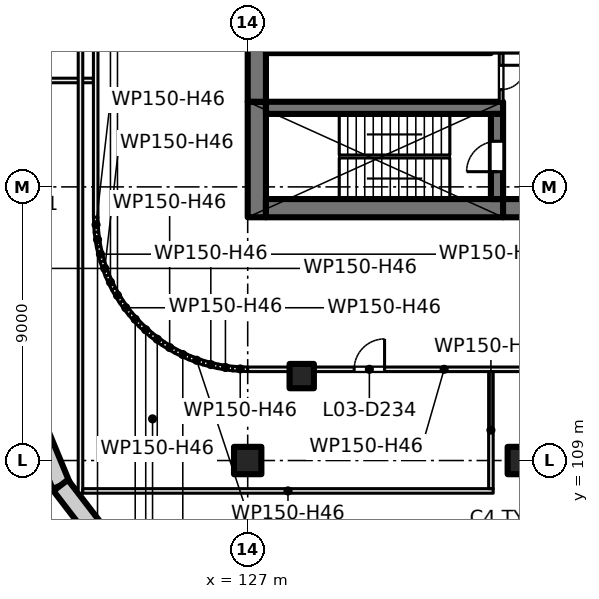
"""IFC4 building model, lengths in metres.
Left out: names, types, materials, properties, quantities, classifications, styles, units other than length and angle.
Written with IfcOpenShell. Run it as: python <this file> out.ifc"""

import sys

from ifc_helpers import new_model, si_unit, direction, frame, frame_2d, origin, origin_2d, place, context, subcontext, project, spatial, rectangle, extrude, element, fill, save


model = new_model("IFC4")
c1 = context("Model", 3, precision=1e-05, world=origin(), true_north=direction((0.0, 1.0)))
c2 = subcontext(c1, "Body", "Model", "MODEL_VIEW")
j1 = project(units=[si_unit("LENGTHUNIT", "METRE"), si_unit("PLANEANGLEUNIT", "RADIAN")], contexts=[c1])
p1 = place(None, origin())
s1 = spatial("IfcSite", under=j1, at=p1, CompositionType="ELEMENT")
p2 = place(p1, origin())
s2 = spatial("IfcBuilding", under=s1, at=p2, CompositionType="ELEMENT")
p3 = place(p2, frame((0.0, 0.0, 17.5)))
s3 = spatial("IfcBuildingStorey", under=s2, at=p3, CompositionType="ELEMENT", Elevation=17.5)
for number, where, z_axis, x_axis in (
    (1, (127.0, 109.0, 0.0), (0.0, 0.0, 1.0), (1.0, 0.0, 0.0)),
    (2, (136.0, 109.0, 0.0), (0.0, 0.0, 1.0), (1.0, 0.0, 0.0)),
):
    element("IfcColumn", number, at=place(p3, frame(where, z_axis=z_axis, x_axis=x_axis)), inside=s3, PredefinedType="COLUMN", context=c2, shape_type="SweptSolid", body=[
        extrude(rectangle(XDim=0.9, YDim=0.9, at=origin_2d()), origin(), (0.0, 0.0, 1.0), 5.0),
    ])
p4 = place(p3, frame((128.777, 111.777, 0.0), z_axis=(0.0, 0.0, 1.0), x_axis=(1.0, 0.0, 0.0)))
e3 = element("IfcColumn", 3, at=p4, inside=s3, PredefinedType="COLUMN", context=c2, shape_type="SweptSolid", body=[
    extrude(rectangle(XDim=0.8, YDim=0.8, at=origin_2d()), origin(), (0.0, 0.0, 1.0), 5.0),
])
p5 = place(p3, frame((127.3, 117.0, 0.0), z_axis=(0.0, 0.0, 1.0), x_axis=(0.0, 1.0, 0.0)))
e4 = element("IfcWall", 4, at=p5, inside=s3, PredefinedType="SHEAR", context=c2, shape_type="SweptSolid", body=[
    extrude(rectangle(XDim=3.8, YDim=0.6, at=frame_2d((1.9, 0.0))), origin(), (0.0, 0.0, 1.0), 5.0),
])
p6 = place(p3, frame((127.3, 120.8, 0.0), z_axis=(0.0, 0.0, 1.0), x_axis=(0.0, 1.0, 0.0)))
e5 = element("IfcWall", 5, at=p6, inside=s3, PredefinedType="SHEAR", context=c2, shape_type="SweptSolid", body=[
    extrude(rectangle(XDim=14.4, YDim=0.6, at=frame_2d((7.2, 0.0))), origin(), (0.0, 0.0, 1.0), 5.0),
])
p7 = place(p3, frame((127.6, 117.3, 0.0), z_axis=(0.0, 0.0, 1.0), x_axis=(1.0, 0.0, 0.0)))
e6 = element("IfcWall", 6, at=p7, inside=s3, PredefinedType="SHEAR", context=c2, shape_type="SweptSolid", body=[
    extrude(rectangle(XDim=7.8, YDim=0.6, at=frame_2d((3.9, 0.0))), origin(), (0.0, 0.0, 1.0), 5.0),
])
p8 = place(p3, frame((135.4, 117.3, 0.0), z_axis=(0.0, 0.0, 1.0), x_axis=(1.0, 0.0, 0.0)))
e7 = element("IfcWall", 7, at=p8, inside=s3, PredefinedType="SHEAR", context=c2, shape_type="SweptSolid", body=[
    extrude(rectangle(XDim=4.6, YDim=0.6, at=frame_2d((2.3, 0.0))), origin(), (0.0, 0.0, 1.0), 5.0),
])
p9 = place(p3, frame((127.6, 120.6, 0.0), z_axis=(0.0, 0.0, 1.0), x_axis=(1.0, 0.0, 0.0)))
e8 = element("IfcWall", 8, at=p9, inside=s3, PredefinedType="SHEAR", context=c2, shape_type="SweptSolid", body=[
    extrude(rectangle(XDim=7.8, YDim=0.4, at=frame_2d((3.9, 0.0))), origin(), (0.0, 0.0, 1.0), 5.0),
])
p10 = place(p3, frame((135.2, 117.6, 0.0), z_axis=(0.0, 0.0, 1.0), x_axis=(0.0, 1.0, 0.0)))
e9 = element("IfcWall", 9, at=p10, inside=s3, PredefinedType="SHEAR", context=c2, shape_type="SweptSolid", body=[
    extrude(rectangle(XDim=2.8, YDim=0.4, at=frame_2d((1.4, 0.0))), origin(), (0.0, 0.0, 1.0), 5.0),
])
p11 = place(p10, frame((0.9, 0.0, 0.0)))
e10 = element("IfcOpeningElement", 10, at=p11, cuts=e9, PredefinedType="OPENING", context=c2, shape_type="SweptSolid", body=[
    extrude(rectangle(XDim=1.0, YDim=2.1, at=frame_2d((0.5, 1.05))), frame((0.0, 0.21, 0.0), z_axis=(0.0, -1.0, 0.0), x_axis=(1.0, 0.0, 0.0)), (0.0, 0.0, 1.0), 0.42),
])
p12 = place(p3, frame((127.6, 122.6, 0.0), z_axis=(0.0, 0.0, 1.0), x_axis=(1.0, 0.0, 0.0)))
e11 = element("IfcWall", 11, at=p12, inside=s3, PredefinedType="SHEAR", context=c2, shape_type="SweptSolid", body=[
    extrude(rectangle(XDim=7.4, YDim=0.4, at=frame_2d((3.7, 0.0))), origin(), (0.0, 0.0, 1.0), 5.0),
])
p13 = place(p3, frame((120.86, 108.181, 0.0), z_axis=(0.0, 0.0, 1.0), x_axis=(-0.382341242798, 0.924021197839, 0.0)))
e12 = element("IfcWall", 12, at=p13, inside=s3, PredefinedType="SOLIDWALL", context=c2, shape_type="SweptSolid", body=[
    extrude(rectangle(XDim=2.044, YDim=0.6, at=frame_2d((1.022, 0.0))), origin(), (0.0, 0.0, 1.0), 4.6),
])
p14 = place(p3, frame((122.135, 106.507, 0.0), z_axis=(0.0, 0.0, 1.0), x_axis=(-0.609052002567, 0.79313029079, 0.0)))
e13 = element("IfcWall", 13, at=p14, inside=s3, PredefinedType="SOLIDWALL", context=c2, shape_type="SweptSolid", body=[
    extrude(rectangle(XDim=2.114, YDim=0.6, at=frame_2d((1.057, 0.0))), origin(), (0.0, 0.0, 1.0), 4.6),
])
p15 = place(p3, frame((139.6, 122.5, 0.0), z_axis=(0.0, 0.0, 1.0), x_axis=(-1.0, 0.0, 0.0)))
e14 = element("IfcWall", 14, at=p15, inside=s3, PredefinedType="PARTITIONING", context=c2, shape_type="SweptSolid", body=[
    extrude(rectangle(XDim=4.6, YDim=0.2, at=frame_2d((2.3, 0.0))), origin(), (0.0, 0.0, 1.0), 4.6),
])
p16 = place(p15, frame((1.35, 0.0, 0.0)))
e15 = element("IfcOpeningElement", 15, at=p16, cuts=e14, PredefinedType="OPENING", context=c2, shape_type="SweptSolid", body=[
    extrude(rectangle(XDim=1.5, YDim=2.1, at=frame_2d((0.75, 1.05))), frame((0.0, 0.11, 0.0), z_axis=(0.0, -1.0, 0.0), x_axis=(1.0, 0.0, 0.0)), (0.0, 0.0, 1.0), 0.22),
])
p17 = place(p3, frame((135.337, 122.4, 0.0), z_axis=(0.0, 0.0, 1.0), x_axis=(0.0, -1.0, 0.0)))
e16 = element("IfcWall", 16, at=p17, inside=s3, PredefinedType="PARTITIONING", context=c2, shape_type="SweptSolid", body=[
    extrude(rectangle(XDim=1.6, YDim=0.125, at=frame_2d((0.8, 0.0))), origin(), (0.0, 0.0, 1.0), 4.6),
])
p18 = place(p17, frame((0.4, 0.0, 0.0)))
e17 = element("IfcOpeningElement", 17, at=p18, cuts=e16, PredefinedType="OPENING", context=c2, shape_type="SweptSolid", body=[
    extrude(rectangle(XDim=0.8, YDim=2.1, at=frame_2d((0.4, 1.05))), frame((0.0, 0.073, 0.0), z_axis=(0.0, -1.0, 0.0), x_axis=(1.0, 0.0, 0.0)), (0.0, 0.0, 1.0), 0.145),
])
p19 = place(p3, frame((113.075, 121.5, 0.0), z_axis=(0.0, 0.0, 1.0), x_axis=(1.0, 0.0, 0.0)))
e18 = element("IfcWall", 18, at=p19, inside=s3, PredefinedType="PARTITIONING", context=c2, shape_type="SweptSolid", body=[
    extrude(rectangle(XDim=8.85, YDim=0.15, at=frame_2d((4.425, 0.0))), origin(), (0.0, 0.0, 1.0), 4.6),
])
p20 = place(p3, frame((121.5, 107.925, 0.0), z_axis=(0.0, 0.0, 1.0), x_axis=(0.0, 1.0, 0.0)))
e19 = element("IfcWall", 19, at=p20, inside=s3, PredefinedType="PARTITIONING", context=c2, shape_type="SweptSolid", body=[
    extrude(rectangle(XDim=40.247, YDim=0.15, at=frame_2d((20.124, 0.0))), origin(), (0.0, 0.0, 1.0), 4.6),
])
p21 = place(p3, frame((121.575, 108.0, 0.0), z_axis=(0.0, 0.0, 1.0), x_axis=(1.0, 0.0, 0.0)))
e20 = element("IfcWall", 20, at=p21, inside=s3, PredefinedType="PARTITIONING", context=c2, shape_type="SweptSolid", body=[
    extrude(rectangle(XDim=13.5, YDim=0.15, at=frame_2d((6.75, 0.0))), origin(), (0.0, 0.0, 1.0), 4.6),
])
p22 = place(p3, frame((122.0, 139.002, 0.0), z_axis=(0.0, 0.0, 1.0), x_axis=(0.0, -1.0, 0.0)))
e21 = element("IfcWall", 21, at=p22, inside=s3, PredefinedType="PARTITIONING", context=c2, shape_type="SweptSolid", body=[
    extrude(rectangle(XDim=22.004, YDim=0.15, at=frame_2d((11.002, 0.0))), origin(), (0.0, 0.0, 1.0), 4.6),
])
p23 = place(p22, frame((10.252, 0.0, 0.0)))
e22 = element("IfcOpeningElement", 22, at=p23, cuts=e21, PredefinedType="OPENING", context=c2, shape_type="SweptSolid", body=[
    extrude(rectangle(XDim=1.0, YDim=2.1, at=frame_2d((0.5, 1.05))), frame((0.0, 0.085, 0.0), z_axis=(0.0, -1.0, 0.0), x_axis=(1.0, 0.0, 0.0)), (0.0, 0.0, 1.0), 0.17),
])
p24 = place(p3, frame((122.0, 117.002, 0.0), z_axis=(0.0, 0.0, 1.0), x_axis=(0.048196018647, -0.998837896651, 0.0)))
e23 = element("IfcWall", 23, at=p24, inside=s3, PredefinedType="PARTITIONING", context=c2, shape_type="SweptSolid", body=[
    extrude(rectangle(XDim=0.496, YDim=0.15, at=frame_2d((0.248, 0.0))), origin(), (0.0, 0.0, 1.0), 4.6),
])
p25 = place(p3, frame((122.023, 116.514, 0.0), z_axis=(0.0, 0.0, 1.0), x_axis=(0.148412307247, -0.988925572052, 0.0)))
e24 = element("IfcWall", 24, at=p25, inside=s3, PredefinedType="PARTITIONING", context=c2, shape_type="SweptSolid", body=[
    extrude(rectangle(XDim=0.499, YDim=0.15, at=frame_2d((0.249, 0.0))), origin(), (0.0, 0.0, 1.0), 4.6),
])
p26 = place(p3, frame((122.095, 116.029, 0.0), z_axis=(0.0, 0.0, 1.0), x_axis=(0.242650732785, -0.970113715952, 0.0)))
e25 = element("IfcWall", 25, at=p26, inside=s3, PredefinedType="PARTITIONING", context=c2, shape_type="SweptSolid", body=[
    extrude(rectangle(XDim=0.499, YDim=0.15, at=frame_2d((0.25, 0.0))), origin(), (0.0, 0.0, 1.0), 4.6),
])
for number, where, z_axis, x_axis in (
    (26, (122.214, 115.553, 0.0), (0.0, 0.0, 1.0), (0.337, -0.941, 0.0)),
    (27, (122.379, 115.09, 0.0), (0.0, 0.0, 1.0), (0.428, -0.904, 0.0)),
):
    element("IfcWall", number, at=place(p3, frame(where, z_axis=z_axis, x_axis=x_axis)), inside=s3, PredefinedType="PARTITIONING", context=c2, shape_type="SweptSolid", body=[
        extrude(rectangle(XDim=0.498, YDim=0.15, at=frame_2d((0.249, 0.0))), origin(), (0.0, 0.0, 1.0), 4.6),
    ])
p27 = place(p3, frame((122.588, 114.646, 0.0), z_axis=(0.0, 0.0, 1.0), x_axis=(0.515791778052, -0.85671397893, 0.0)))
e28 = element("IfcWall", 28, at=p27, inside=s3, PredefinedType="PARTITIONING", context=c2, shape_type="SweptSolid", body=[
    extrude(rectangle(XDim=0.499, YDim=0.15, at=frame_2d((0.249, 0.0))), origin(), (0.0, 0.0, 1.0), 4.6),
])
p28 = place(p3, frame((122.841, 114.225, 0.0), z_axis=(0.0, 0.0, 1.0), x_axis=(0.594570362092, -0.80404358372, 0.0)))
e29 = element("IfcWall", 29, at=p28, inside=s3, PredefinedType="PARTITIONING", context=c2, shape_type="SweptSolid", body=[
    extrude(rectangle(XDim=0.498, YDim=0.15, at=frame_2d((0.249, 0.0))), origin(), (0.0, 0.0, 1.0), 4.6),
])
for number, where, z_axis, x_axis in (
    (30, (123.133, 113.831, 0.0), (0.0, 0.0, 1.0), (0.67, -0.742, 0.0)),
    (31, (123.461, 113.467, 0.0), (0.0, 0.0, 1.0), (0.742, -0.67, 0.0)),
):
    element("IfcWall", number, at=place(p3, frame(where, z_axis=z_axis, x_axis=x_axis)), inside=s3, PredefinedType="PARTITIONING", context=c2, shape_type="SweptSolid", body=[
        extrude(rectangle(XDim=0.499, YDim=0.15, at=frame_2d((0.249, 0.0))), origin(), (0.0, 0.0, 1.0), 4.6),
    ])
p29 = place(p3, frame((123.825, 113.137, 0.0), z_axis=(0.0, 0.0, 1.0), x_axis=(0.80404358372, -0.594570362092, 0.0)))
e32 = element("IfcWall", 32, at=p29, inside=s3, PredefinedType="PARTITIONING", context=c2, shape_type="SweptSolid", body=[
    extrude(rectangle(XDim=0.498, YDim=0.15, at=frame_2d((0.249, 0.0))), origin(), (0.0, 0.0, 1.0), 4.6),
])
p30 = place(p3, frame((124.219, 112.845, 0.0), z_axis=(0.0, 0.0, 1.0), x_axis=(0.85671397893, -0.515791778052, 0.0)))
e33 = element("IfcWall", 33, at=p30, inside=s3, PredefinedType="PARTITIONING", context=c2, shape_type="SweptSolid", body=[
    extrude(rectangle(XDim=0.499, YDim=0.15, at=frame_2d((0.249, 0.0))), origin(), (0.0, 0.0, 1.0), 4.6),
])
for number, where, z_axis, x_axis in (
    (34, (124.64, 112.592, 0.0), (0.0, 0.0, 1.0), (0.904, -0.428, 0.0)),
    (35, (125.084, 112.382, 0.0), (0.0, 0.0, 1.0), (0.941, -0.337, 0.0)),
):
    element("IfcWall", number, at=place(p3, frame(where, z_axis=z_axis, x_axis=x_axis)), inside=s3, PredefinedType="PARTITIONING", context=c2, shape_type="SweptSolid", body=[
        extrude(rectangle(XDim=0.498, YDim=0.15, at=frame_2d((0.249, 0.0))), origin(), (0.0, 0.0, 1.0), 4.6),
    ])
p31 = place(p3, frame((125.545, 112.216, 0.0), z_axis=(0.0, 0.0, 1.0), x_axis=(0.970113715952, -0.242650732785, 0.0)))
e36 = element("IfcWall", 36, at=p31, inside=s3, PredefinedType="PARTITIONING", context=c2, shape_type="SweptSolid", body=[
    extrude(rectangle(XDim=0.499, YDim=0.15, at=frame_2d((0.25, 0.0))), origin(), (0.0, 0.0, 1.0), 4.6),
])
p32 = place(p3, frame((126.021, 112.097, 0.0), z_axis=(0.0, 0.0, 1.0), x_axis=(0.988925572052, -0.148412307247, 0.0)))
e37 = element("IfcWall", 37, at=p32, inside=s3, PredefinedType="PARTITIONING", context=c2, shape_type="SweptSolid", body=[
    extrude(rectangle(XDim=0.499, YDim=0.15, at=frame_2d((0.249, 0.0))), origin(), (0.0, 0.0, 1.0), 4.6),
])
p33 = place(p3, frame((126.506, 112.024, 0.0), z_axis=(0.0, 0.0, 1.0), x_axis=(0.998837896651, -0.048196018647, 0.0)))
e38 = element("IfcWall", 38, at=p33, inside=s3, PredefinedType="PARTITIONING", context=c2, shape_type="SweptSolid", body=[
    extrude(rectangle(XDim=0.496, YDim=0.15, at=frame_2d((0.248, 0.0))), origin(), (0.0, 0.0, 1.0), 4.6),
])
p34 = place(p3, frame((139.925, 112.0, 0.0), z_axis=(0.0, 0.0, 1.0), x_axis=(-1.0, 0.0, 0.0)))
e39 = element("IfcWall", 39, at=p34, inside=s3, PredefinedType="PARTITIONING", context=c2, shape_type="SweptSolid", body=[
    extrude(rectangle(XDim=12.927, YDim=0.15, at=frame_2d((6.463, 0.0))), origin(), (0.0, 0.0, 1.0), 4.6),
])
p35 = place(p34, frame((8.423, 0.0, 0.0)))
e40 = element("IfcOpeningElement", 40, at=p35, cuts=e39, PredefinedType="OPENING", context=c2, shape_type="SweptSolid", body=[
    extrude(rectangle(XDim=1.0, YDim=2.1, at=frame_2d((0.5, 1.05))), frame((0.0, 0.085, 0.0), z_axis=(0.0, -1.0, 0.0), x_axis=(1.0, 0.0, 0.0)), (0.0, 0.0, 1.0), 0.17),
])
p36 = place(p3, frame((135.0, 108.075, 0.0), z_axis=(0.0, 0.0, 1.0), x_axis=(0.0, 1.0, 0.0)))
e41 = element("IfcWall", 41, at=p36, inside=s3, PredefinedType="PARTITIONING", context=c2, shape_type="SweptSolid", body=[
    extrude(rectangle(XDim=3.85, YDim=0.15, at=frame_2d((1.925, 0.0))), origin(), (0.0, 0.0, 1.0), 4.6),
])
p37 = place(p11, origin())
e42 = element("IfcDoor", 42, at=p37, inside=s3, OperationType="SINGLE_SWING_RIGHT", PredefinedType="DOOR", context=c2, shape_type="SweptSolid", body=[
    extrude(rectangle(XDim=1.0, YDim=2.1, at=frame_2d((0.5, 1.05))), frame((0.0, 0.025, 0.0), z_axis=(0.0, -1.0, 0.0), x_axis=(1.0, 0.0, 0.0)), (0.0, 0.0, 1.0), 0.05),
])
fill(e10, e42)
p38 = place(p18, origin())
e43 = element("IfcDoor", 43, at=p38, inside=s3, OperationType="SINGLE_SWING_LEFT", PredefinedType="DOOR", context=c2, shape_type="SweptSolid", body=[
    extrude(rectangle(XDim=0.8, YDim=2.1, at=frame_2d((0.4, 1.05))), frame((0.0, 0.025, 0.0), z_axis=(0.0, -1.0, 0.0), x_axis=(1.0, 0.0, 0.0)), (0.0, 0.0, 1.0), 0.05),
])
fill(e17, e43)
p39 = place(p35, origin())
e44 = element("IfcDoor", 44, at=p39, inside=s3, OperationType="SINGLE_SWING_LEFT", PredefinedType="DOOR", context=c2, shape_type="SweptSolid", body=[
    extrude(rectangle(XDim=1.0, YDim=2.1, at=frame_2d((0.5, 1.05))), frame((0.0, 0.025, 0.0), z_axis=(0.0, -1.0, 0.0), x_axis=(1.0, 0.0, 0.0)), (0.0, 0.0, 1.0), 0.05),
])
fill(e40, e44)
save(model, sys.argv[1])
